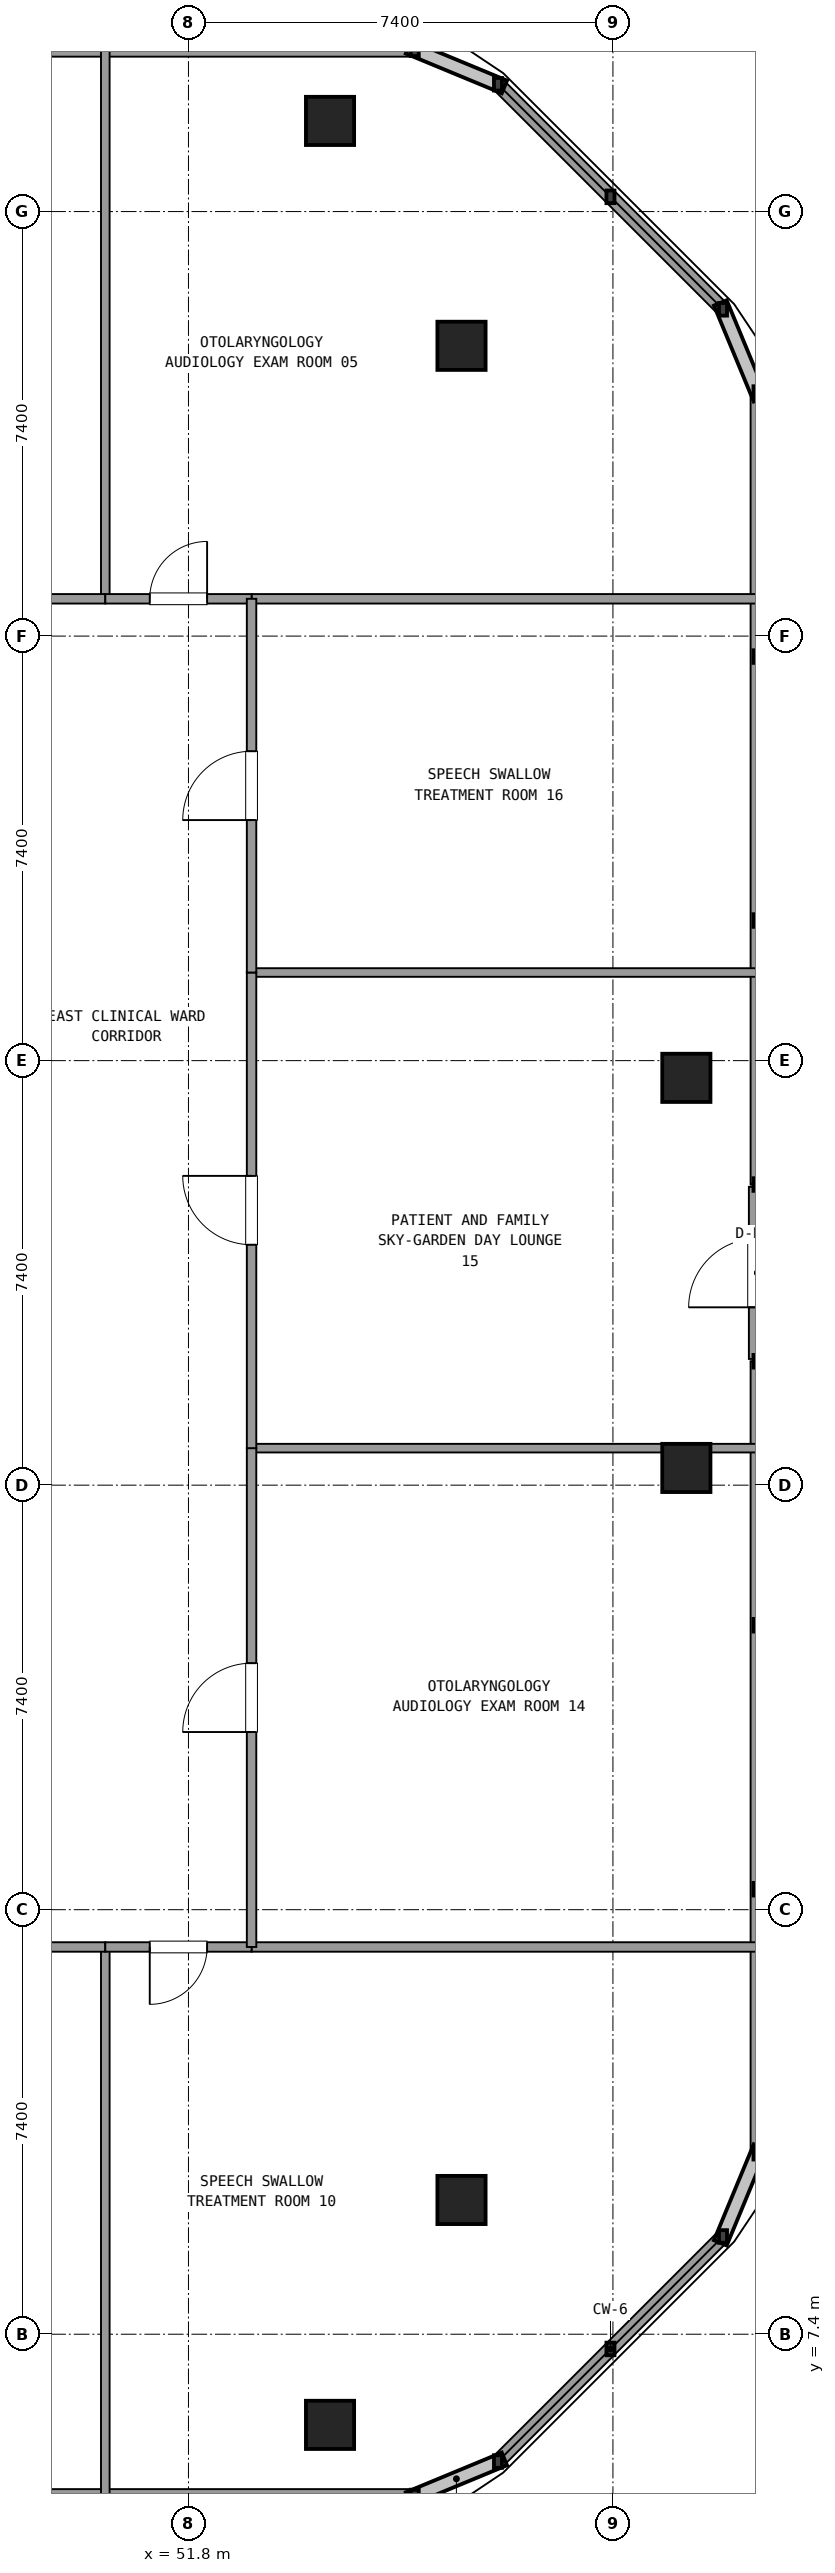
"""IFC4 building model, lengths in metres.
Left out: names, types, materials, properties, quantities, classifications, styles, units other than length and angle.
Written with IfcOpenShell. Run it as: python <this file> out.ifc"""

import sys

from ifc_helpers import new_model, si_unit, direction, frame, frame_2d, origin, origin_2d, place, context, subcontext, project, spatial, rectangle, extrude, element, fill, save


model = new_model("IFC4")
c1 = context("Model", 3, precision=1e-05, world=origin(), true_north=direction((0.0, 1.0)))
c2 = subcontext(c1, "Body", "Model", "MODEL_VIEW")
j1 = project(units=[si_unit("LENGTHUNIT", "METRE"), si_unit("PLANEANGLEUNIT", "RADIAN")], contexts=[c1])
p1 = place(None, origin())
s1 = spatial("IfcSite", under=j1, at=p1, CompositionType="ELEMENT")
p2 = place(p1, origin())
s2 = spatial("IfcBuilding", under=s1, at=p2, CompositionType="ELEMENT")
p3 = place(p2, frame((0.0, 0.0, 257.22)))
s3 = spatial("IfcBuildingStorey", under=s2, at=p3, CompositionType="ELEMENT", Elevation=257.22)
for number, where, z_axis, x_axis in (
    (1, (54.268, 5.82, 0.0), (0.0, 0.0, 1.0), (1.0, 0.0, 0.0)),
    (2, (56.56, 9.74, 0.0), (0.0, 0.0, 1.0), (1.0, 0.0, 0.0)),
    (3, (60.48, 22.5, 0.0), (0.0, 0.0, 1.0), (1.0, 0.0, 0.0)),
    (4, (60.48, 29.3, 0.0), (0.0, 0.0, 1.0), (1.0, 0.0, 0.0)),
    (5, (56.56, 42.06, 0.0), (0.0, 0.0, 1.0), (1.0, 0.0, 0.0)),
    (6, (54.268, 45.98, 0.0), (0.0, 0.0, 1.0), (1.0, 0.0, 0.0)),
):
    element("IfcColumn", number, at=place(p3, frame(where, z_axis=z_axis, x_axis=x_axis)), inside=s3, PredefinedType="COLUMN", context=c2, shape_type="SweptSolid", body=[
        extrude(rectangle(XDim=0.84, YDim=0.84, at=origin_2d()), origin(), (0.0, 0.0, 1.0), 3.6),
    ])
p4 = place(p3, frame((18.255, 4.58, 0.0), z_axis=(0.0, 0.0, 1.0), x_axis=(1.0, 0.0, 0.0)))
e7 = element("IfcWall", 7, at=p4, inside=s3, PredefinedType="SOLIDWALL", context=c2, shape_type="SweptSolid", body=[
    extrude(rectangle(XDim=37.49, YDim=0.24, at=frame_2d((18.745, 0.0))), origin(), (0.0, 0.0, 1.0), 0.85),
])
p5 = place(p3, frame((57.196, 5.181, 0.0), z_axis=(0.0, 0.0, 1.0), x_axis=(0.707084777957, 0.707128783731, 0.0)))
e8 = element("IfcWall", 8, at=p5, inside=s3, PredefinedType="SOLIDWALL", context=c2, shape_type="SweptSolid", body=[
    extrude(rectangle(XDim=5.548, YDim=0.24, at=frame_2d((2.774, 0.0))), origin(), (0.0, 0.0, 1.0), 0.85),
])
p6 = place(p3, frame((61.72, 24.4, 0.0), z_axis=(0.0, 0.0, 1.0), x_axis=(0.0, 1.0, 0.0)))
e9 = element("IfcWall", 9, at=p6, inside=s3, PredefinedType="SOLIDWALL", context=c2, shape_type="SweptSolid", body=[
    extrude(rectangle(XDim=3.0, YDim=0.3, at=frame_2d((1.5, 0.0))), origin(), (0.0, 0.0, 1.0), 2.69),
])
p7 = place(p6, frame((0.9, 0.0, 0.0)))
e10 = element("IfcOpeningElement", 10, at=p7, cuts=e9, PredefinedType="OPENING", context=c2, shape_type="SweptSolid", body=[
    extrude(rectangle(XDim=1.2, YDim=2.2, at=frame_2d((0.6, 1.1))), frame((0.0, 0.16, 0.0), z_axis=(0.0, -1.0, 0.0), x_axis=(1.0, 0.0, 0.0)), (0.0, 0.0, 1.0), 0.32),
])
for number, where, z_axis, x_axis in (
    (11, (61.72, 10.555, 0.0), (0.0, 0.0, 1.0), (0.0, 1.0, 0.0)),
    (12, (61.72, 27.44, 0.0), (0.0, 0.0, 1.0), (0.0, 1.0, 0.0)),
):
    element("IfcWall", number, at=place(p3, frame(where, z_axis=z_axis, x_axis=x_axis)), inside=s3, PredefinedType="SOLIDWALL", context=c2, shape_type="SweptSolid", body=[
        extrude(rectangle(XDim=13.805, YDim=0.24, at=frame_2d((6.903, 0.0))), origin(), (0.0, 0.0, 1.0), 0.85),
    ])
p8 = place(p3, frame((61.119, 42.696, 0.0), z_axis=(0.0, 0.0, 1.0), x_axis=(-0.707106781187, 0.707106781187, 0.0)))
e13 = element("IfcWall", 13, at=p8, inside=s3, PredefinedType="SOLIDWALL", context=c2, shape_type="SweptSolid", body=[
    extrude(rectangle(XDim=5.548, YDim=0.24, at=frame_2d((2.774, 0.0))), origin(), (0.0, 0.0, 1.0), 0.85),
])
p9 = place(p3, frame((55.745, 47.22, 0.0), z_axis=(0.0, 0.0, 1.0), x_axis=(-1.0, 0.0, 0.0)))
e14 = element("IfcWall", 14, at=p9, inside=s3, PredefinedType="SOLIDWALL", context=c2, shape_type="SweptSolid", body=[
    extrude(rectangle(XDim=37.49, YDim=0.24, at=frame_2d((18.745, 0.0))), origin(), (0.0, 0.0, 1.0), 0.85),
])
for number, where, z_axis, x_axis in (
    (15, (52.9, 37.65, 0.0), (0.0, 0.0, 1.0), (1.0, 0.0, 0.0)),
    (16, (52.9, 14.15, 0.0), (0.0, 0.0, 1.0), (1.0, 0.0, 0.0)),
):
    element("IfcWall", number, at=place(p3, frame(where, z_axis=z_axis, x_axis=x_axis)), inside=s3, PredefinedType="PARTITIONING", context=c2, shape_type="SweptSolid", body=[
        extrude(rectangle(XDim=8.8, YDim=0.165, at=frame_2d((4.4, 0.0))), origin(), (0.0, 0.0, 1.0), 2.61),
    ])
p10 = place(p3, frame((50.35, 37.65, 0.0), z_axis=(0.0, 0.0, 1.0), x_axis=(0.0, 1.0, 0.0)))
e17 = element("IfcWall", 17, at=p10, inside=s3, PredefinedType="PARTITIONING", context=c2, shape_type="SweptSolid", body=[
    extrude(rectangle(XDim=9.55, YDim=0.15, at=frame_2d((4.775, 0.0))), origin(), (0.0, 0.0, 1.0), 2.61),
])
p11 = place(p3, frame((42.194, 37.65, 0.0), z_axis=(0.0, 0.0, 1.0), x_axis=(1.0, 0.0, 0.0)))
e18 = element("IfcWall", 18, at=p11, inside=s3, PredefinedType="PARTITIONING", context=c2, shape_type="SweptSolid", body=[
    extrude(rectangle(XDim=8.156, YDim=0.165, at=frame_2d((4.078, 0.0))), origin(), (0.0, 0.0, 1.0), 2.61),
])
p12 = place(p11, frame((3.478, 0.0, 0.0)))
e19 = element("IfcOpeningElement", 19, at=p12, cuts=e18, PredefinedType="OPENING", context=c2, shape_type="SweptSolid", body=[
    extrude(rectangle(XDim=1.2, YDim=2.15, at=frame_2d((0.6, 1.075))), frame((0.0, 0.093, 0.0), z_axis=(0.0, -1.0, 0.0), x_axis=(1.0, 0.0, 0.0)), (0.0, 0.0, 1.0), 0.185),
])
p13 = place(p3, frame((50.35, 37.65, 0.0), z_axis=(0.0, 0.0, 1.0), x_axis=(1.0, 0.0, 0.0)))
e20 = element("IfcWall", 20, at=p13, inside=s3, PredefinedType="PARTITIONING", context=c2, shape_type="SweptSolid", body=[
    extrude(rectangle(XDim=2.55, YDim=0.165, at=frame_2d((1.275, 0.0))), origin(), (0.0, 0.0, 1.0), 2.61),
])
p14 = place(p13, frame((0.775, 0.0, 0.0)))
e21 = element("IfcOpeningElement", 21, at=p14, cuts=e20, PredefinedType="OPENING", context=c2, shape_type="SweptSolid", body=[
    extrude(rectangle(XDim=1.0, YDim=2.15, at=frame_2d((0.5, 1.075))), frame((0.0, 0.093, 0.0), z_axis=(0.0, -1.0, 0.0), x_axis=(1.0, 0.0, 0.0)), (0.0, 0.0, 1.0), 0.185),
])
p15 = place(p3, frame((50.35, 14.15, 0.0), z_axis=(0.0, 0.0, 1.0), x_axis=(0.0, -1.0, 0.0)))
e22 = element("IfcWall", 22, at=p15, inside=s3, PredefinedType="PARTITIONING", context=c2, shape_type="SweptSolid", body=[
    extrude(rectangle(XDim=9.55, YDim=0.15, at=frame_2d((4.775, 0.0))), origin(), (0.0, 0.0, 1.0), 2.61),
])
p16 = place(p3, frame((39.842, 14.15, 0.0), z_axis=(0.0, 0.0, 1.0), x_axis=(1.0, 0.0, 0.0)))
e23 = element("IfcWall", 23, at=p16, inside=s3, PredefinedType="PARTITIONING", context=c2, shape_type="SweptSolid", body=[
    extrude(rectangle(XDim=10.508, YDim=0.165, at=frame_2d((5.254, 0.0))), origin(), (0.0, 0.0, 1.0), 2.61),
])
p17 = place(p16, frame((4.654, 0.0, 0.0)))
e24 = element("IfcOpeningElement", 24, at=p17, cuts=e23, PredefinedType="OPENING", context=c2, shape_type="SweptSolid", body=[
    extrude(rectangle(XDim=1.2, YDim=2.15, at=frame_2d((0.6, 1.075))), frame((0.0, 0.093, 0.0), z_axis=(0.0, -1.0, 0.0), x_axis=(1.0, 0.0, 0.0)), (0.0, 0.0, 1.0), 0.185),
])
p18 = place(p3, frame((50.35, 14.15, 0.0), z_axis=(0.0, 0.0, 1.0), x_axis=(1.0, 0.0, 0.0)))
e25 = element("IfcWall", 25, at=p18, inside=s3, PredefinedType="PARTITIONING", context=c2, shape_type="SweptSolid", body=[
    extrude(rectangle(XDim=2.55, YDim=0.165, at=frame_2d((1.275, 0.0))), origin(), (0.0, 0.0, 1.0), 2.61),
])
p19 = place(p18, frame((0.775, 0.0, 0.0)))
e26 = element("IfcOpeningElement", 26, at=p19, cuts=e25, PredefinedType="OPENING", context=c2, shape_type="SweptSolid", body=[
    extrude(rectangle(XDim=1.0, YDim=2.15, at=frame_2d((0.5, 1.075))), frame((0.0, 0.093, 0.0), z_axis=(0.0, -1.0, 0.0), x_axis=(1.0, 0.0, 0.0)), (0.0, 0.0, 1.0), 0.185),
])
p20 = place(p3, frame((52.9, 22.845, 0.0), z_axis=(0.0, 0.0, 1.0), x_axis=(1.0, 0.0, 0.0)))
e27 = element("IfcWall", 27, at=p20, inside=s3, PredefinedType="PARTITIONING", context=c2, shape_type="SweptSolid", body=[
    extrude(rectangle(XDim=8.8, YDim=0.15, at=frame_2d((4.4, 0.0))), origin(), (0.0, 0.0, 1.0), 2.61),
])
p21 = place(p3, frame((52.9, 14.15, 0.0), z_axis=(0.0, 0.0, 1.0), x_axis=(0.0, 1.0, 0.0)))
e28 = element("IfcWall", 28, at=p21, inside=s3, PredefinedType="PARTITIONING", context=c2, shape_type="SweptSolid", body=[
    extrude(rectangle(XDim=8.695, YDim=0.165, at=frame_2d((4.348, 0.0))), origin(), (0.0, 0.0, 1.0), 2.61),
])
p22 = place(p21, frame((3.747, 0.0, 0.0)))
e29 = element("IfcOpeningElement", 29, at=p22, cuts=e28, PredefinedType="OPENING", context=c2, shape_type="SweptSolid", body=[
    extrude(rectangle(XDim=1.2, YDim=2.15, at=frame_2d((0.6, 1.075))), frame((0.0, 0.093, 0.0), z_axis=(0.0, -1.0, 0.0), x_axis=(1.0, 0.0, 0.0)), (0.0, 0.0, 1.0), 0.185),
])
p23 = place(p3, frame((52.9, 31.136, 0.0), z_axis=(0.0, 0.0, 1.0), x_axis=(1.0, 0.0, 0.0)))
e30 = element("IfcWall", 30, at=p23, inside=s3, PredefinedType="PARTITIONING", context=c2, shape_type="SweptSolid", body=[
    extrude(rectangle(XDim=8.8, YDim=0.15, at=frame_2d((4.4, 0.0))), origin(), (0.0, 0.0, 1.0), 2.61),
])
p24 = place(p3, frame((52.9, 22.845, 0.0), z_axis=(0.0, 0.0, 1.0), x_axis=(0.0, 1.0, 0.0)))
e31 = element("IfcWall", 31, at=p24, inside=s3, PredefinedType="PARTITIONING", context=c2, shape_type="SweptSolid", body=[
    extrude(rectangle(XDim=8.291, YDim=0.165, at=frame_2d((4.146, 0.0))), origin(), (0.0, 0.0, 1.0), 2.61),
])
p25 = place(p24, frame((3.546, 0.0, 0.0)))
e32 = element("IfcOpeningElement", 32, at=p25, cuts=e31, PredefinedType="OPENING", context=c2, shape_type="SweptSolid", body=[
    extrude(rectangle(XDim=1.2, YDim=2.15, at=frame_2d((0.6, 1.075))), frame((0.0, 0.093, 0.0), z_axis=(0.0, -1.0, 0.0), x_axis=(1.0, 0.0, 0.0)), (0.0, 0.0, 1.0), 0.185),
])
p26 = place(p3, frame((52.9, 31.136, 0.0), z_axis=(0.0, 0.0, 1.0), x_axis=(0.0, 1.0, 0.0)))
e33 = element("IfcWall", 33, at=p26, inside=s3, PredefinedType="PARTITIONING", context=c2, shape_type="SweptSolid", body=[
    extrude(rectangle(XDim=6.514, YDim=0.165, at=frame_2d((3.257, 0.0))), origin(), (0.0, 0.0, 1.0), 2.61),
])
p27 = place(p26, frame((2.657, 0.0, 0.0)))
e34 = element("IfcOpeningElement", 34, at=p27, cuts=e33, PredefinedType="OPENING", context=c2, shape_type="SweptSolid", body=[
    extrude(rectangle(XDim=1.2, YDim=2.15, at=frame_2d((0.6, 1.075))), frame((0.0, 0.093, 0.0), z_axis=(0.0, -1.0, 0.0), x_axis=(1.0, 0.0, 0.0)), (0.0, 0.0, 1.0), 0.185),
])
p28 = place(p14, origin())
e35 = element("IfcDoor", 35, at=p28, inside=s3, OperationType="SINGLE_SWING_RIGHT", PredefinedType="DOOR", context=c2, shape_type="SweptSolid", body=[
    extrude(rectangle(XDim=1.0, YDim=2.15, at=frame_2d((0.5, 1.075))), frame((0.0, 0.025, 0.0), z_axis=(0.0, -1.0, 0.0), x_axis=(1.0, 0.0, 0.0)), (0.0, 0.0, 1.0), 0.05),
])
fill(e21, e35)
p29 = place(p19, frame((1.0, 0.0, 0.0), z_axis=(0.0, 0.0, 1.0), x_axis=(-1.0, 0.0, 0.0)))
e36 = element("IfcDoor", 36, at=p29, inside=s3, OperationType="SINGLE_SWING_LEFT", PredefinedType="DOOR", context=c2, shape_type="SweptSolid", body=[
    extrude(rectangle(XDim=1.0, YDim=2.15, at=frame_2d((0.5, 1.075))), frame((0.0, 0.025, 0.0), z_axis=(0.0, -1.0, 0.0), x_axis=(1.0, 0.0, 0.0)), (0.0, 0.0, 1.0), 0.05),
])
fill(e26, e36)
p30 = place(p22, origin())
e37 = element("IfcDoor", 37, at=p30, inside=s3, OperationType="SINGLE_SWING_LEFT", PredefinedType="DOOR", context=c2, shape_type="SweptSolid", body=[
    extrude(rectangle(XDim=1.2, YDim=2.15, at=frame_2d((0.6, 1.075))), frame((0.0, 0.025, 0.0), z_axis=(0.0, -1.0, 0.0), x_axis=(1.0, 0.0, 0.0)), (0.0, 0.0, 1.0), 0.05),
])
fill(e29, e37)
p31 = place(p25, origin())
e38 = element("IfcDoor", 38, at=p31, inside=s3, OperationType="SINGLE_SWING_RIGHT", PredefinedType="DOOR", context=c2, shape_type="SweptSolid", body=[
    extrude(rectangle(XDim=1.2, YDim=2.15, at=frame_2d((0.6, 1.075))), frame((0.0, 0.025, 0.0), z_axis=(0.0, -1.0, 0.0), x_axis=(1.0, 0.0, 0.0)), (0.0, 0.0, 1.0), 0.05),
])
fill(e32, e38)
p32 = place(p27, origin())
e39 = element("IfcDoor", 39, at=p32, inside=s3, OperationType="SINGLE_SWING_LEFT", PredefinedType="DOOR", context=c2, shape_type="SweptSolid", body=[
    extrude(rectangle(XDim=1.2, YDim=2.15, at=frame_2d((0.6, 1.075))), frame((0.0, 0.025, 0.0), z_axis=(0.0, -1.0, 0.0), x_axis=(1.0, 0.0, 0.0)), (0.0, 0.0, 1.0), 0.05),
])
fill(e34, e39)
save(model, sys.argv[1])
